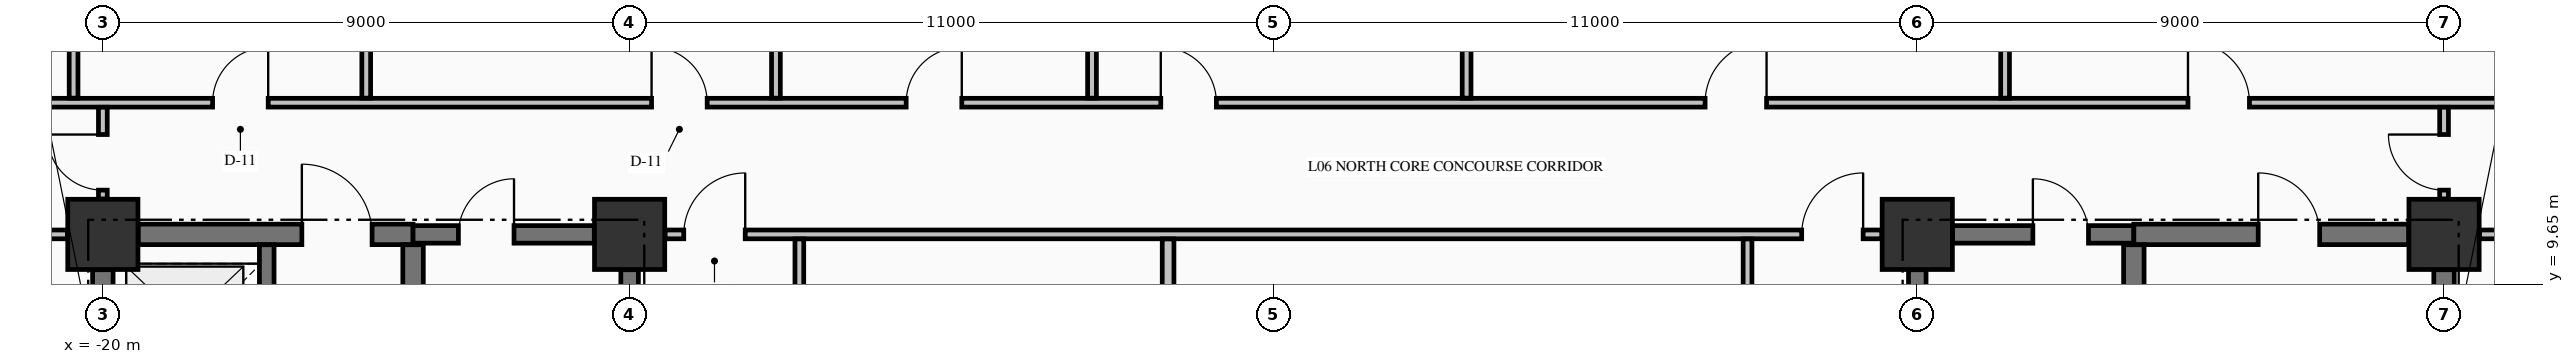
"""IFC4 building model, lengths in metres.
Left out: names, types, materials, properties, quantities, classifications, styles, units other than length and angle.
Written with IfcOpenShell. Run it as: python <this file> out.ifc"""

import sys

from ifc_helpers import new_model, si_unit, direction, frame, frame_2d, origin, origin_2d, place, context, subcontext, project, spatial, rectangle, extrude, element, fill, save


model = new_model("IFC4")
c1 = context("Model", 3, precision=1e-05, world=origin(), true_north=direction((0.0, 1.0)))
c2 = subcontext(c1, "Body", "Model", "MODEL_VIEW")
j1 = project(units=[si_unit("LENGTHUNIT", "METRE"), si_unit("PLANEANGLEUNIT", "RADIAN")], contexts=[c1])
p1 = place(None, origin())
s1 = spatial("IfcSite", under=j1, at=p1, CompositionType="ELEMENT")
p2 = place(p1, origin())
s2 = spatial("IfcBuilding", under=s1, at=p2, CompositionType="ELEMENT")
p3 = place(p2, frame((0.0, 0.0, 30.77)))
s3 = spatial("IfcBuildingStorey", under=s2, at=p3, CompositionType="ELEMENT", Elevation=30.77)
for number, where, z_axis, x_axis in (
    (1, (-20.0, 10.5, -0.25), (0.0, 0.0, 1.0), (1.0, 0.0, 0.0)),
    (2, (-11.0, 10.5, -0.25), (0.0, 0.0, 1.0), (1.0, 0.0, 0.0)),
    (3, (11.0, 10.5, -0.25), (0.0, 0.0, 1.0), (1.0, 0.0, 0.0)),
    (4, (20.0, 10.5, -0.25), (0.0, 0.0, 1.0), (1.0, 0.0, 0.0)),
):
    element("IfcColumn", number, at=place(p3, frame(where, z_axis=z_axis, x_axis=x_axis)), inside=s3, PredefinedType="COLUMN", context=c2, shape_type="SweptSolid", body=[
        extrude(rectangle(XDim=1.2, YDim=1.2, at=origin_2d()), origin(), (0.0, 0.0, 1.0), 3.52),
    ])
p4 = place(p3, frame((-19.396, 10.5, 0.0), z_axis=(0.0, 0.0, 1.0), x_axis=(1.0, 0.0, 0.0)))
e5 = element("IfcWall", 5, at=p4, inside=s3, PredefinedType="SHEAR", context=c2, shape_type="SweptSolid", body=[
    extrude(rectangle(XDim=4.696, YDim=0.35, at=frame_2d((2.348, 0.0))), origin(), (0.0, 0.0, 1.0), 3.27),
])
p5 = place(p4, frame((2.796, 0.0, 0.0)))
e6 = element("IfcOpeningElement", 6, at=p5, cuts=e5, PredefinedType="OPENING", context=c2, shape_type="SweptSolid", body=[
    extrude(rectangle(XDim=1.2, YDim=2.15, at=frame_2d((0.6, 1.075))), frame((0.0, 0.185, 0.0), z_axis=(0.0, -1.0, 0.0), x_axis=(1.0, 0.0, 0.0)), (0.0, 0.0, 1.0), 0.37),
])
p6 = place(p3, frame((-14.7, 10.5, 0.0), z_axis=(0.0, 0.0, 1.0), x_axis=(1.0, 0.0, 0.0)))
e7 = element("IfcWall", 7, at=p6, inside=s3, PredefinedType="SHEAR", context=c2, shape_type="SweptSolid", body=[
    extrude(rectangle(XDim=3.096, YDim=0.3, at=frame_2d((1.548, 0.0))), origin(), (0.0, 0.0, 1.0), 3.27),
])
p7 = place(p6, frame((0.775, 0.0, 0.0)))
e8 = element("IfcOpeningElement", 8, at=p7, cuts=e7, PredefinedType="OPENING", context=c2, shape_type="SweptSolid", body=[
    extrude(rectangle(XDim=0.95, YDim=2.15, at=frame_2d((0.475, 1.075))), frame((0.0, 0.16, 0.0), z_axis=(0.0, -1.0, 0.0), x_axis=(1.0, 0.0, 0.0)), (0.0, 0.0, 1.0), 0.32),
])
p8 = place(p3, frame((11.604, 10.5, 0.0), z_axis=(0.0, 0.0, 1.0), x_axis=(1.0, 0.0, 0.0)))
e9 = element("IfcWall", 9, at=p8, inside=s3, PredefinedType="SHEAR", context=c2, shape_type="SweptSolid", body=[
    extrude(rectangle(XDim=3.096, YDim=0.3, at=frame_2d((1.548, 0.0))), origin(), (0.0, 0.0, 1.0), 3.27),
])
p9 = place(p8, frame((1.371, 0.0, 0.0)))
e10 = element("IfcOpeningElement", 10, at=p9, cuts=e9, PredefinedType="OPENING", context=c2, shape_type="SweptSolid", body=[
    extrude(rectangle(XDim=0.95, YDim=2.15, at=frame_2d((0.475, 1.075))), frame((0.0, 0.16, 0.0), z_axis=(0.0, -1.0, 0.0), x_axis=(1.0, 0.0, 0.0)), (0.0, 0.0, 1.0), 0.32),
])
p10 = place(p3, frame((14.7, 10.5, 0.0), z_axis=(0.0, 0.0, 1.0), x_axis=(1.0, 0.0, 0.0)))
e11 = element("IfcWall", 11, at=p10, inside=s3, PredefinedType="SHEAR", context=c2, shape_type="SweptSolid", body=[
    extrude(rectangle(XDim=4.696, YDim=0.35, at=frame_2d((2.348, 0.0))), origin(), (0.0, 0.0, 1.0), 3.27),
])
p11 = place(p10, frame((2.125, 0.0, 0.0)))
e12 = element("IfcOpeningElement", 12, at=p11, cuts=e11, PredefinedType="OPENING", context=c2, shape_type="SweptSolid", body=[
    extrude(rectangle(XDim=1.05, YDim=2.15, at=frame_2d((0.525, 1.075))), frame((0.0, 0.185, 0.0), z_axis=(0.0, -1.0, 0.0), x_axis=(1.0, 0.0, 0.0)), (0.0, 0.0, 1.0), 0.37),
])
p12 = place(p3, frame((-23.835, 10.5, 0.0), z_axis=(0.0, 0.0, 1.0), x_axis=(1.0, 0.0, 0.0)))
e13 = element("IfcWall", 13, at=p12, inside=s3, PredefinedType="PARTITIONING", context=c2, shape_type="SweptSolid", body=[
    extrude(rectangle(XDim=3.229, YDim=0.15, at=frame_2d((1.615, 0.0))), origin(), (0.0, 0.0, 1.0), 3.27),
])
p13 = place(p12, frame((1.335, 0.0, 0.0)))
e14 = element("IfcOpeningElement", 14, at=p13, cuts=e13, PredefinedType="OPENING", context=c2, shape_type="SweptSolid", body=[
    extrude(rectangle(XDim=1.0, YDim=2.15, at=frame_2d((0.5, 1.075))), frame((0.0, 0.085, 0.0), z_axis=(0.0, -1.0, 0.0), x_axis=(1.0, 0.0, 0.0)), (0.0, 0.0, 1.0), 0.17),
])
p14 = place(p3, frame((-10.394, 10.5, 0.0), z_axis=(0.0, 0.0, 1.0), x_axis=(1.0, 0.0, 0.0)))
e15 = element("IfcWall", 15, at=p14, inside=s3, PredefinedType="PARTITIONING", context=c2, shape_type="SweptSolid", body=[
    extrude(rectangle(XDim=20.788, YDim=0.15, at=frame_2d((10.394, 0.0))), origin(), (0.0, 0.0, 1.0), 3.27),
])
p15 = place(p14, frame((0.319, 0.0, 0.0)))
e16 = element("IfcOpeningElement", 16, at=p15, cuts=e15, PredefinedType="OPENING", context=c2, shape_type="SweptSolid", body=[
    extrude(rectangle(XDim=1.05, YDim=2.15, at=frame_2d((0.525, 1.075))), frame((0.0, 0.085, 0.0), z_axis=(0.0, -1.0, 0.0), x_axis=(1.0, 0.0, 0.0)), (0.0, 0.0, 1.0), 0.17),
])
p16 = place(p14, frame((19.419, 0.0, 0.0)))
e17 = element("IfcOpeningElement", 17, at=p16, cuts=e15, PredefinedType="OPENING", context=c2, shape_type="SweptSolid", body=[
    extrude(rectangle(XDim=1.05, YDim=2.15, at=frame_2d((0.525, 1.075))), frame((0.0, 0.085, 0.0), z_axis=(0.0, -1.0, 0.0), x_axis=(1.0, 0.0, 0.0)), (0.0, 0.0, 1.0), 0.17),
])
p17 = place(p3, frame((20.606, 10.5, 0.0), z_axis=(0.0, 0.0, 1.0), x_axis=(1.0, 0.0, 0.0)))
e18 = element("IfcWall", 18, at=p17, inside=s3, PredefinedType="PARTITIONING", context=c2, shape_type="SweptSolid", body=[
    extrude(rectangle(XDim=8.229, YDim=0.15, at=frame_2d((4.115, 0.0))), origin(), (0.0, 0.0, 1.0), 3.27),
])
p18 = place(p17, frame((3.419, 0.0, 0.0)))
e19 = element("IfcOpeningElement", 19, at=p18, cuts=e18, PredefinedType="OPENING", context=c2, shape_type="SweptSolid", body=[
    extrude(rectangle(XDim=0.95, YDim=2.15, at=frame_2d((0.475, 1.075))), frame((0.0, 0.085, 0.0), z_axis=(0.0, -1.0, 0.0), x_axis=(1.0, 0.0, 0.0)), (0.0, 0.0, 1.0), 0.17),
])
p19 = place(p3, frame((-23.835, 12.75, 0.0), z_axis=(0.0, 0.0, 1.0), x_axis=(1.0, 0.0, 0.0)))
e20 = element("IfcWall", 20, at=p19, inside=s3, PredefinedType="PARTITIONING", context=c2, shape_type="SweptSolid", body=[
    extrude(rectangle(XDim=52.67, YDim=0.15, at=frame_2d((26.335, 0.0))), origin(), (0.0, 0.0, 1.0), 3.27),
])
p20 = place(p19, frame((5.71, 0.0, 0.0)))
e21 = element("IfcOpeningElement", 21, at=p20, cuts=e20, PredefinedType="OPENING", context=c2, shape_type="SweptSolid", body=[
    extrude(rectangle(XDim=0.95, YDim=2.15, at=frame_2d((0.475, 1.075))), frame((0.0, 0.085, 0.0), z_axis=(0.0, -1.0, 0.0), x_axis=(1.0, 0.0, 0.0)), (0.0, 0.0, 1.0), 0.17),
])
p21 = place(p19, frame((13.21, 0.0, 0.0)))
e22 = element("IfcOpeningElement", 22, at=p21, cuts=e20, PredefinedType="OPENING", context=c2, shape_type="SweptSolid", body=[
    extrude(rectangle(XDim=0.95, YDim=2.15, at=frame_2d((0.475, 1.075))), frame((0.0, 0.085, 0.0), z_axis=(0.0, -1.0, 0.0), x_axis=(1.0, 0.0, 0.0)), (0.0, 0.0, 1.0), 0.17),
])
p22 = place(p19, frame((17.56, 0.0, 0.0)))
e23 = element("IfcOpeningElement", 23, at=p22, cuts=e20, PredefinedType="OPENING", context=c2, shape_type="SweptSolid", body=[
    extrude(rectangle(XDim=0.95, YDim=2.15, at=frame_2d((0.475, 1.075))), frame((0.0, 0.085, 0.0), z_axis=(0.0, -1.0, 0.0), x_axis=(1.0, 0.0, 0.0)), (0.0, 0.0, 1.0), 0.17),
])
p23 = place(p19, frame((21.91, 0.0, 0.0)))
e24 = element("IfcOpeningElement", 24, at=p23, cuts=e20, PredefinedType="OPENING", context=c2, shape_type="SweptSolid", body=[
    extrude(rectangle(XDim=0.95, YDim=2.15, at=frame_2d((0.475, 1.075))), frame((0.0, 0.085, 0.0), z_axis=(0.0, -1.0, 0.0), x_axis=(1.0, 0.0, 0.0)), (0.0, 0.0, 1.0), 0.17),
])
p24 = place(p19, frame((31.21, 0.0, 0.0)))
e25 = element("IfcOpeningElement", 25, at=p24, cuts=e20, PredefinedType="OPENING", context=c2, shape_type="SweptSolid", body=[
    extrude(rectangle(XDim=1.05, YDim=2.15, at=frame_2d((0.525, 1.075))), frame((0.0, 0.085, 0.0), z_axis=(0.0, -1.0, 0.0), x_axis=(1.0, 0.0, 0.0)), (0.0, 0.0, 1.0), 0.17),
])
p25 = place(p19, frame((39.46, 0.0, 0.0)))
e26 = element("IfcOpeningElement", 26, at=p25, cuts=e20, PredefinedType="OPENING", context=c2, shape_type="SweptSolid", body=[
    extrude(rectangle(XDim=1.05, YDim=2.15, at=frame_2d((0.525, 1.075))), frame((0.0, 0.085, 0.0), z_axis=(0.0, -1.0, 0.0), x_axis=(1.0, 0.0, 0.0)), (0.0, 0.0, 1.0), 0.17),
])
p26 = place(p3, frame((-20.0, 7.727, 0.0), z_axis=(0.0, 0.0, 1.0), x_axis=(0.0, 1.0, 0.0)))
e27 = element("IfcWall", 27, at=p26, inside=s3, PredefinedType="SHEAR", context=c2, shape_type="SweptSolid", body=[
    extrude(rectangle(XDim=2.169, YDim=0.35, at=frame_2d((1.084, 0.0))), origin(), (0.0, 0.0, 1.0), 3.27),
])
p27 = place(p3, frame((-17.2, 7.727, 0.0), z_axis=(0.0, 0.0, 1.0), x_axis=(0.0, 1.0, 0.0)))
e28 = element("IfcWall", 28, at=p27, inside=s3, PredefinedType="SOLIDWALL", context=c2, shape_type="SweptSolid", body=[
    extrude(rectangle(XDim=2.596, YDim=0.25, at=frame_2d((1.298, 0.0))), origin(), (0.0, 0.0, 1.0), 3.27),
])
p28 = place(p27, frame((0.773, 0.0, 0.0)))
e29 = element("IfcOpeningElement", 29, at=p28, cuts=e28, PredefinedType="OPENING", context=c2, shape_type="SweptSolid", body=[
    extrude(rectangle(XDim=1.1, YDim=2.2, at=frame_2d((0.55, 1.1))), frame((0.0, 0.135, 0.0), z_axis=(0.0, -1.0, 0.0), x_axis=(1.0, 0.0, 0.0)), (0.0, 0.0, 1.0), 0.27),
])
p29 = place(p3, frame((-14.7, 5.852, 0.0), z_axis=(0.0, 0.0, 1.0), x_axis=(0.0, 1.0, 0.0)))
e30 = element("IfcWall", 30, at=p29, inside=s3, PredefinedType="SHEAR", context=c2, shape_type="SweptSolid", body=[
    extrude(rectangle(XDim=4.471, YDim=0.35, at=frame_2d((2.235, 0.0))), origin(), (0.0, 0.0, 1.0), 3.27),
])
for number, where, z_axis, x_axis in (
    (31, (-11.0, 5.852, 0.0), (0.0, 0.0, 1.0), (0.0, 1.0, 0.0)),
    (32, (11.0, 5.852, 0.0), (0.0, 0.0, 1.0), (0.0, 1.0, 0.0)),
):
    element("IfcWall", number, at=place(p3, frame(where, z_axis=z_axis, x_axis=x_axis)), inside=s3, PredefinedType="SHEAR", context=c2, shape_type="SweptSolid", body=[
        extrude(rectangle(XDim=4.044, YDim=0.3, at=frame_2d((2.022, 0.0))), origin(), (0.0, 0.0, 1.0), 3.27),
    ])
p30 = place(p3, frame((14.7, 5.852, 0.0), z_axis=(0.0, 0.0, 1.0), x_axis=(0.0, 1.0, 0.0)))
e33 = element("IfcWall", 33, at=p30, inside=s3, PredefinedType="SHEAR", context=c2, shape_type="SweptSolid", body=[
    extrude(rectangle(XDim=4.471, YDim=0.35, at=frame_2d((2.235, 0.0))), origin(), (0.0, 0.0, 1.0), 3.27),
])
p31 = place(p3, frame((20.0, 0.604, 0.0), z_axis=(0.0, 0.0, 1.0), x_axis=(0.0, 1.0, 0.0)))
e34 = element("IfcWall", 34, at=p31, inside=s3, PredefinedType="SHEAR", context=c2, shape_type="SweptSolid", body=[
    extrude(rectangle(XDim=9.292, YDim=0.35, at=frame_2d((4.646, 0.0))), origin(), (0.0, 0.0, 1.0), 3.27),
])
p32 = place(p3, frame((-20.5, 12.828, 0.0), z_axis=(0.0, 0.0, 1.0), x_axis=(0.0, 1.0, 0.0)))
e35 = element("IfcWall", 35, at=p32, inside=s3, PredefinedType="PARTITIONING", context=c2, shape_type="SweptSolid", body=[
    extrude(rectangle(XDim=9.466, YDim=0.15, at=frame_2d((4.733, 0.0))), origin(), (0.0, 0.0, 1.0), 3.27),
])
p33 = place(p3, frame((-20.0, 11.106, 0.0), z_axis=(0.0, 0.0, 1.0), x_axis=(0.0, 1.0, 0.0)))
e36 = element("IfcWall", 36, at=p33, inside=s3, PredefinedType="PARTITIONING", context=c2, shape_type="SweptSolid", body=[
    extrude(rectangle(XDim=1.566, YDim=0.15, at=frame_2d((0.783, 0.0))), origin(), (0.0, 0.0, 1.0), 3.27),
])
p34 = place(p33, frame((0.15, 0.0, 0.0)))
e37 = element("IfcOpeningElement", 37, at=p34, cuts=e36, PredefinedType="OPENING", context=c2, shape_type="SweptSolid", body=[
    extrude(rectangle(XDim=0.95, YDim=2.15, at=frame_2d((0.475, 1.075))), frame((0.0, 0.085, 0.0), z_axis=(0.0, -1.0, 0.0), x_axis=(1.0, 0.0, 0.0)), (0.0, 0.0, 1.0), 0.17),
])
for number, where, z_axis, x_axis in (
    (38, (-15.5, 12.828, 0.0), (0.0, 0.0, 1.0), (0.0, 1.0, 0.0)),
    (39, (-8.5, 12.828, 0.0), (0.0, 0.0, 1.0), (0.0, 1.0, 0.0)),
):
    element("IfcWall", number, at=place(p3, frame(where, z_axis=z_axis, x_axis=x_axis)), inside=s3, PredefinedType="PARTITIONING", context=c2, shape_type="SweptSolid", body=[
        extrude(rectangle(XDim=13.507, YDim=0.15, at=frame_2d((6.753, 0.0))), origin(), (0.0, 0.0, 1.0), 3.27),
    ])
p35 = place(p3, frame((-8.1, 0.903, 0.0), z_axis=(0.0, 0.0, 1.0), x_axis=(0.0, 1.0, 0.0)))
e40 = element("IfcWall", 40, at=p35, inside=s3, PredefinedType="PARTITIONING", context=c2, shape_type="SweptSolid", body=[
    extrude(rectangle(XDim=9.519, YDim=0.15, at=frame_2d((4.76, 0.0))), origin(), (0.0, 0.0, 1.0), 3.27),
])
p36 = place(p35, frame((4.222, 0.0, 0.0)))
e41 = element("IfcOpeningElement", 41, at=p36, cuts=e40, PredefinedType="OPENING", context=c2, shape_type="SweptSolid", body=[
    extrude(rectangle(XDim=1.05, YDim=2.15, at=frame_2d((0.525, 1.075))), frame((0.0, 0.085, 0.0), z_axis=(0.0, -1.0, 0.0), x_axis=(1.0, 0.0, 0.0)), (0.0, 0.0, 1.0), 0.17),
])
p37 = place(p3, frame((-3.1, 12.828, 0.0), z_axis=(0.0, 0.0, 1.0), x_axis=(0.0, 1.0, 0.0)))
e42 = element("IfcWall", 42, at=p37, inside=s3, PredefinedType="PARTITIONING", context=c2, shape_type="SweptSolid", body=[
    extrude(rectangle(XDim=13.507, YDim=0.15, at=frame_2d((6.753, 0.0))), origin(), (0.0, 0.0, 1.0), 3.27),
])
p38 = place(p3, frame((-1.8, 0.903, 0.0), z_axis=(0.0, 0.0, 1.0), x_axis=(0.0, 1.0, 0.0)))
e43 = element("IfcWall", 43, at=p38, inside=s3, PredefinedType="PARTITIONING", context=c2, shape_type="SweptSolid", body=[
    extrude(rectangle(XDim=9.519, YDim=0.2, at=frame_2d((4.76, 0.0))), origin(), (0.0, 0.0, 1.0), 3.27),
])
p39 = place(p3, frame((3.3, 12.828, 0.0), z_axis=(0.0, 0.0, 1.0), x_axis=(0.0, 1.0, 0.0)))
e44 = element("IfcWall", 44, at=p39, inside=s3, PredefinedType="PARTITIONING", context=c2, shape_type="SweptSolid", body=[
    extrude(rectangle(XDim=13.507, YDim=0.15, at=frame_2d((6.753, 0.0))), origin(), (0.0, 0.0, 1.0), 3.27),
])
p40 = place(p3, frame((8.1, 0.303, 0.0), z_axis=(0.0, 0.0, 1.0), x_axis=(0.0, 1.0, 0.0)))
e45 = element("IfcWall", 45, at=p40, inside=s3, PredefinedType="PARTITIONING", context=c2, shape_type="SweptSolid", body=[
    extrude(rectangle(XDim=10.119, YDim=0.15, at=frame_2d((5.06, 0.0))), origin(), (0.0, 0.0, 1.0), 3.27),
])
p41 = place(p40, frame((4.497, 0.0, 0.0)))
e46 = element("IfcOpeningElement", 46, at=p41, cuts=e45, PredefinedType="OPENING", context=c2, shape_type="SweptSolid", body=[
    extrude(rectangle(XDim=1.1, YDim=2.15, at=frame_2d((0.55, 1.075))), frame((0.0, 0.085, 0.0), z_axis=(0.0, -1.0, 0.0), x_axis=(1.0, 0.0, 0.0)), (0.0, 0.0, 1.0), 0.17),
])
p42 = place(p3, frame((12.5, 12.828, 0.0), z_axis=(0.0, 0.0, 1.0), x_axis=(0.0, 1.0, 0.0)))
e47 = element("IfcWall", 47, at=p42, inside=s3, PredefinedType="PARTITIONING", context=c2, shape_type="SweptSolid", body=[
    extrude(rectangle(XDim=13.507, YDim=0.15, at=frame_2d((6.753, 0.0))), origin(), (0.0, 0.0, 1.0), 3.27),
])
p43 = place(p3, frame((20.0, 11.106, 0.0), z_axis=(0.0, 0.0, 1.0), x_axis=(0.0, 1.0, 0.0)))
e48 = element("IfcWall", 48, at=p43, inside=s3, PredefinedType="PARTITIONING", context=c2, shape_type="SweptSolid", body=[
    extrude(rectangle(XDim=1.566, YDim=0.15, at=frame_2d((0.783, 0.0))), origin(), (0.0, 0.0, 1.0), 2.61),
])
p44 = place(p43, frame((0.15, 0.0, 0.0)))
e49 = element("IfcOpeningElement", 49, at=p44, cuts=e48, PredefinedType="OPENING", context=c2, shape_type="SweptSolid", body=[
    extrude(rectangle(XDim=0.95, YDim=2.15, at=frame_2d((0.475, 1.075))), frame((0.0, 0.085, 0.0), z_axis=(0.0, -1.0, 0.0), x_axis=(1.0, 0.0, 0.0)), (0.0, 0.0, 1.0), 0.17),
])
p45 = place(p7, origin())
e50 = element("IfcDoor", 50, at=p45, inside=s3, OperationType="SINGLE_SWING_RIGHT", PredefinedType="DOOR", context=c2, shape_type="SweptSolid", body=[
    extrude(rectangle(XDim=0.95, YDim=2.15, at=frame_2d((0.475, 1.075))), frame((0.0, 0.025, 0.0), z_axis=(0.0, -1.0, 0.0), x_axis=(1.0, 0.0, 0.0)), (0.0, 0.0, 1.0), 0.05),
])
fill(e8, e50)
p46 = place(p9, origin())
e51 = element("IfcDoor", 51, at=p46, inside=s3, OperationType="SINGLE_SWING_LEFT", PredefinedType="DOOR", context=c2, shape_type="SweptSolid", body=[
    extrude(rectangle(XDim=0.95, YDim=2.15, at=frame_2d((0.475, 1.075))), frame((0.0, 0.025, 0.0), z_axis=(0.0, -1.0, 0.0), x_axis=(1.0, 0.0, 0.0)), (0.0, 0.0, 1.0), 0.05),
])
fill(e10, e51)
p47 = place(p5, origin())
e52 = element("IfcDoor", 52, at=p47, inside=s3, OperationType="SINGLE_SWING_LEFT", PredefinedType="DOOR", context=c2, shape_type="SweptSolid", body=[
    extrude(rectangle(XDim=1.2, YDim=2.15, at=frame_2d((0.6, 1.075))), frame((0.0, 0.025, 0.0), z_axis=(0.0, -1.0, 0.0), x_axis=(1.0, 0.0, 0.0)), (0.0, 0.0, 1.0), 0.05),
])
fill(e6, e52)
p48 = place(p11, origin())
e53 = element("IfcDoor", 53, at=p48, inside=s3, OperationType="SINGLE_SWING_LEFT", PredefinedType="DOOR", context=c2, shape_type="SweptSolid", body=[
    extrude(rectangle(XDim=1.05, YDim=2.15, at=frame_2d((0.525, 1.075))), frame((0.0, 0.025, 0.0), z_axis=(0.0, -1.0, 0.0), x_axis=(1.0, 0.0, 0.0)), (0.0, 0.0, 1.0), 0.05),
])
fill(e12, e53)
p49 = place(p15, origin())
e54 = element("IfcDoor", 54, at=p49, inside=s3, OperationType="SINGLE_SWING_RIGHT", PredefinedType="DOOR", context=c2, shape_type="SweptSolid", body=[
    extrude(rectangle(XDim=1.05, YDim=2.15, at=frame_2d((0.525, 1.075))), frame((0.0, 0.025, 0.0), z_axis=(0.0, -1.0, 0.0), x_axis=(1.0, 0.0, 0.0)), (0.0, 0.0, 1.0), 0.05),
])
fill(e16, e54)
p50 = place(p16, origin())
e55 = element("IfcDoor", 55, at=p50, inside=s3, OperationType="SINGLE_SWING_RIGHT", PredefinedType="DOOR", context=c2, shape_type="SweptSolid", body=[
    extrude(rectangle(XDim=1.05, YDim=2.15, at=frame_2d((0.525, 1.075))), frame((0.0, 0.025, 0.0), z_axis=(0.0, -1.0, 0.0), x_axis=(1.0, 0.0, 0.0)), (0.0, 0.0, 1.0), 0.05),
])
fill(e17, e55)
p51 = place(p20, origin())
e56 = element("IfcDoor", 56, at=p51, inside=s3, OperationType="SINGLE_SWING_RIGHT", PredefinedType="DOOR", context=c2, shape_type="SweptSolid", body=[
    extrude(rectangle(XDim=0.95, YDim=2.15, at=frame_2d((0.475, 1.075))), frame((0.0, 0.025, 0.0), z_axis=(0.0, -1.0, 0.0), x_axis=(1.0, 0.0, 0.0)), (0.0, 0.0, 1.0), 0.05),
])
fill(e21, e56)
p52 = place(p21, origin())
e57 = element("IfcDoor", 57, at=p52, inside=s3, OperationType="SINGLE_SWING_LEFT", PredefinedType="DOOR", context=c2, shape_type="SweptSolid", body=[
    extrude(rectangle(XDim=0.95, YDim=2.15, at=frame_2d((0.475, 1.075))), frame((0.0, 0.025, 0.0), z_axis=(0.0, -1.0, 0.0), x_axis=(1.0, 0.0, 0.0)), (0.0, 0.0, 1.0), 0.05),
])
fill(e22, e57)
p53 = place(p22, origin())
e58 = element("IfcDoor", 58, at=p53, inside=s3, OperationType="SINGLE_SWING_RIGHT", PredefinedType="DOOR", context=c2, shape_type="SweptSolid", body=[
    extrude(rectangle(XDim=0.95, YDim=2.15, at=frame_2d((0.475, 1.075))), frame((0.0, 0.025, 0.0), z_axis=(0.0, -1.0, 0.0), x_axis=(1.0, 0.0, 0.0)), (0.0, 0.0, 1.0), 0.05),
])
fill(e23, e58)
p54 = place(p23, origin())
e59 = element("IfcDoor", 59, at=p54, inside=s3, OperationType="SINGLE_SWING_LEFT", PredefinedType="DOOR", context=c2, shape_type="SweptSolid", body=[
    extrude(rectangle(XDim=0.95, YDim=2.15, at=frame_2d((0.475, 1.075))), frame((0.0, 0.025, 0.0), z_axis=(0.0, -1.0, 0.0), x_axis=(1.0, 0.0, 0.0)), (0.0, 0.0, 1.0), 0.05),
])
fill(e24, e59)
p55 = place(p24, origin())
e60 = element("IfcDoor", 60, at=p55, inside=s3, OperationType="SINGLE_SWING_RIGHT", PredefinedType="DOOR", context=c2, shape_type="SweptSolid", body=[
    extrude(rectangle(XDim=1.05, YDim=2.15, at=frame_2d((0.525, 1.075))), frame((0.0, 0.025, 0.0), z_axis=(0.0, -1.0, 0.0), x_axis=(1.0, 0.0, 0.0)), (0.0, 0.0, 1.0), 0.05),
])
fill(e25, e60)
p56 = place(p25, origin())
e61 = element("IfcDoor", 61, at=p56, inside=s3, OperationType="SINGLE_SWING_LEFT", PredefinedType="DOOR", context=c2, shape_type="SweptSolid", body=[
    extrude(rectangle(XDim=1.05, YDim=2.15, at=frame_2d((0.525, 1.075))), frame((0.0, 0.025, 0.0), z_axis=(0.0, -1.0, 0.0), x_axis=(1.0, 0.0, 0.0)), (0.0, 0.0, 1.0), 0.05),
])
fill(e26, e61)
p57 = place(p34, origin())
e62 = element("IfcDoor", 62, at=p57, inside=s3, OperationType="SINGLE_SWING_RIGHT", PredefinedType="DOOR", context=c2, shape_type="SweptSolid", body=[
    extrude(rectangle(XDim=0.95, YDim=2.15, at=frame_2d((0.475, 1.075))), frame((0.0, 0.025, 0.0), z_axis=(0.0, -1.0, 0.0), x_axis=(1.0, 0.0, 0.0)), (0.0, 0.0, 1.0), 0.05),
])
fill(e37, e62)
p58 = place(p44, origin())
e63 = element("IfcDoor", 63, at=p58, inside=s3, OperationType="SINGLE_SWING_RIGHT", PredefinedType="DOOR", context=c2, shape_type="SweptSolid", body=[
    extrude(rectangle(XDim=0.95, YDim=2.15, at=frame_2d((0.475, 1.075))), frame((0.0, 0.025, 0.0), z_axis=(0.0, -1.0, 0.0), x_axis=(1.0, 0.0, 0.0)), (0.0, 0.0, 1.0), 0.05),
])
fill(e49, e63)
save(model, sys.argv[1])
